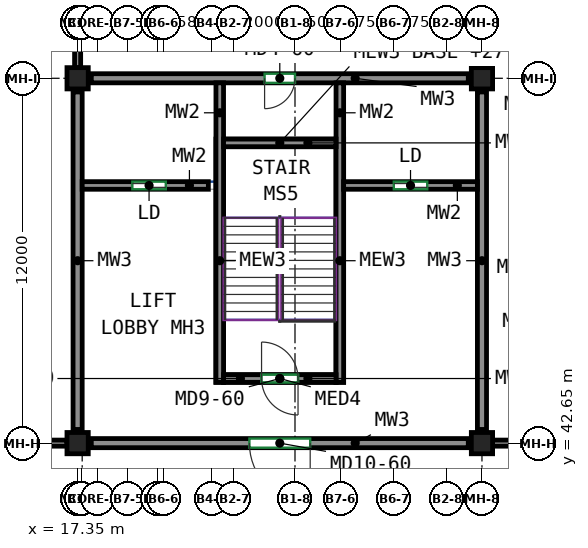
"""IFC4 building model, lengths in metres.
Left out: names, types, materials, properties, quantities, classifications, styles, units other than length and angle.
Written with IfcOpenShell. Run it as: python <this file> out.ifc"""

import sys

from ifc_helpers import new_model, si_unit, direction, frame, frame_2d, origin, origin_2d, place, context, subcontext, project, spatial, rectangle, extrude, source, transform, mapped, element, fill, save


model = new_model("IFC4")
c1 = context("Model", 3, precision=1e-05, world=origin(), true_north=direction((0.0, 1.0)))
c2 = subcontext(c1, "Body", "Model", "MODEL_VIEW")
j1 = project(units=[si_unit("LENGTHUNIT", "METRE"), si_unit("PLANEANGLEUNIT", "RADIAN")], contexts=[c1])
p1 = place(None, origin())
s1 = spatial("IfcSite", under=j1, at=p1, CompositionType="ELEMENT")
p2 = place(p1, origin())
s2 = spatial("IfcBuilding", under=s1, at=p2, CompositionType="ELEMENT")
p3 = place(p2, frame((0.0, 0.0, 22.5)))
s3 = spatial("IfcBuildingStorey", under=s2, at=p3, CompositionType="ELEMENT", Elevation=22.5)
m1 = source(origin(), c2, "Body", "SweptSolid", [
    extrude(rectangle(XDim=0.7, YDim=0.7, at=origin_2d()), origin(), (0.0, 0.0, 1.0), 4.22),
])
for number, where, z_axis, x_axis in (
    (1, (17.35, 42.65, 0.0), (0.0, 0.0, 1.0), (1.0, 0.0, 0.0)),
    (2, (17.35, 54.65, 0.0), (0.0, 0.0, 1.0), (1.0, 0.0, 0.0)),
    (3, (30.65, 42.65, 0.0), (0.0, 0.0, 1.0), (1.0, 0.0, 0.0)),
    (4, (30.65, 54.65, 0.0), (0.0, 0.0, 1.0), (1.0, 0.0, 0.0)),
):
    element("IfcColumn", number, at=place(p3, frame(where, z_axis=z_axis, x_axis=x_axis)), inside=s3, PredefinedType="COLUMN", context=c2, shape_type="MappedRepresentation", body=[
        mapped(m1, transform((0.0, 0.0, 0.0))),
    ])
m2 = source(origin(), c2, "Body", "SweptSolid", [
    extrude(rectangle(XDim=12.4, YDim=0.3, at=frame_2d((6.2, 0.0))), origin(), (0.0, 0.0, 1.0), 3.42),
])
p4 = place(p3, frame((30.2, 54.65, 0.0), z_axis=(0.0, 0.0, 1.0), x_axis=(-1.0, 0.0, 0.0)))
e5 = element("IfcWall", 5, at=p4, inside=s3, PredefinedType="SHEAR", context=c2, shape_type="MappedRepresentation", body=[
    mapped(m2, transform((0.0, 0.0, 0.0))),
])
p5 = place(p4, frame((5.7, 0.0, 0.0)))
e6 = element("IfcOpeningElement", 6, at=p5, cuts=e5, PredefinedType="OPENING", context=c2, shape_type="SweptSolid", body=[
    extrude(rectangle(XDim=1.0, YDim=2.1, at=frame_2d((0.5, 1.05))), frame((0.0, 0.16, 0.0), z_axis=(0.0, -1.0, 0.0), x_axis=(1.0, 0.0, 0.0)), (0.0, 0.0, 1.0), 0.32),
])
p6 = place(p3, frame((30.2, 42.65, 0.0), z_axis=(0.0, 0.0, 1.0), x_axis=(-1.0, 0.0, 0.0)))
e7 = element("IfcWall", 7, at=p6, inside=s3, PredefinedType="SHEAR", context=c2, shape_type="MappedRepresentation", body=[
    mapped(m2, transform((0.0, 0.0, 0.0))),
])
p7 = place(p6, frame((5.2, 0.0, 0.0)))
e8 = element("IfcOpeningElement", 8, at=p7, cuts=e7, PredefinedType="OPENING", context=c2, shape_type="SweptSolid", body=[
    extrude(rectangle(XDim=2.0, YDim=2.4, at=frame_2d((1.0, 1.2))), frame((0.0, 0.16, 0.0), z_axis=(0.0, -1.0, 0.0), x_axis=(1.0, 0.0, 0.0)), (0.0, 0.0, 1.0), 0.32),
])
m3 = source(origin(), c2, "Body", "SweptSolid", [
    extrude(rectangle(XDim=11.1, YDim=0.3, at=frame_2d((5.55, 0.0))), origin(), (0.0, 0.0, 1.0), 3.42),
])
for number, where, z_axis, x_axis in (
    (9, (30.65, 54.2, 0.0), (0.0, 0.0, 1.0), (0.0, -1.0, 0.0)),
    (10, (17.35, 54.2, 0.0), (0.0, 0.0, 1.0), (0.0, -1.0, 0.0)),
):
    element("IfcWall", number, at=place(p3, frame(where, z_axis=z_axis, x_axis=x_axis)), inside=s3, PredefinedType="SHEAR", context=c2, shape_type="MappedRepresentation", body=[
        mapped(m3, transform((0.0, 0.0, 0.0))),
    ])
m4 = source(origin(), c2, "Body", "SweptSolid", [
    extrude(rectangle(XDim=9.85, YDim=0.25, at=frame_2d((4.925, 0.0))), origin(), (0.0, 0.0, 1.0), 4.22),
])
for number, where, z_axis, x_axis in (
    (11, (25.975, 54.5, 0.0), (0.0, 0.0, 1.0), (0.0, -1.0, 0.0)),
    (12, (22.025, 54.5, 0.0), (0.0, 0.0, 1.0), (0.0, -1.0, 0.0)),
):
    element("IfcWall", number, at=place(p3, frame(where, z_axis=z_axis, x_axis=x_axis)), inside=s3, PredefinedType="SHEAR", context=c2, shape_type="MappedRepresentation", body=[
        mapped(m4, transform((0.0, 0.0, 0.0))),
    ])
m5 = source(origin(), c2, "Body", "SweptSolid", [
    extrude(rectangle(XDim=3.7, YDim=0.25, at=frame_2d((1.85, 0.0))), origin(), (0.0, 0.0, 1.0), 4.22),
])
p8 = place(p3, frame((25.85, 52.525, 0.0), z_axis=(0.0, 0.0, 1.0), x_axis=(-1.0, 0.0, 0.0)))
e13 = element("IfcWall", 13, at=p8, inside=s3, PredefinedType="SHEAR", context=c2, shape_type="MappedRepresentation", body=[
    mapped(m5, transform((0.0, 0.0, 0.0))),
])
p9 = place(p3, frame((25.85, 44.775, 0.0), z_axis=(0.0, 0.0, 1.0), x_axis=(-1.0, 0.0, 0.0)))
e14 = element("IfcWall", 14, at=p9, inside=s3, PredefinedType="SHEAR", context=c2, shape_type="MappedRepresentation", body=[
    mapped(m5, transform((0.0, 0.0, 0.0))),
])
p10 = place(p9, frame((1.25, 0.0, 0.0)))
e15 = element("IfcOpeningElement", 15, at=p10, cuts=e14, PredefinedType="OPENING", context=c2, shape_type="SweptSolid", body=[
    extrude(rectangle(XDim=1.2, YDim=2.1, at=frame_2d((0.6, 1.05))), frame((0.0, 0.135, 0.0), z_axis=(0.0, -1.0, 0.0), x_axis=(1.0, 0.0, 0.0)), (0.0, 0.0, 1.0), 0.27),
])
m6 = source(origin(), c2, "Body", "SweptSolid", [
    extrude(rectangle(XDim=4.4, YDim=0.25, at=frame_2d((2.2, 0.0))), origin(), (0.0, 0.0, 1.0), 4.22),
])
p11 = place(p3, frame((30.5, 51.125, 0.0), z_axis=(0.0, 0.0, 1.0), x_axis=(-1.0, 0.0, 0.0)))
e16 = element("IfcWall", 16, at=p11, inside=s3, PredefinedType="SHEAR", context=c2, shape_type="MappedRepresentation", body=[
    mapped(m6, transform((0.0, 0.0, 0.0))),
])
p12 = place(p11, frame((1.65, 0.0, 0.0)))
e17 = element("IfcOpeningElement", 17, at=p12, cuts=e16, PredefinedType="OPENING", context=c2, shape_type="SweptSolid", body=[
    extrude(rectangle(XDim=1.1, YDim=2.1, at=frame_2d((0.55, 1.05))), frame((0.0, 0.135, 0.0), z_axis=(0.0, -1.0, 0.0), x_axis=(1.0, 0.0, 0.0)), (0.0, 0.0, 1.0), 0.27),
])
m7 = source(origin(), c2, "Body", "SweptSolid", [
    extrude(rectangle(XDim=4.15, YDim=0.25, at=frame_2d((2.075, 0.0))), origin(), (0.0, 0.0, 1.0), 4.22),
])
p13 = place(p3, frame((21.65, 51.125, 0.0), z_axis=(0.0, 0.0, 1.0), x_axis=(-1.0, 0.0, 0.0)))
e18 = element("IfcWall", 18, at=p13, inside=s3, PredefinedType="SHEAR", context=c2, shape_type="MappedRepresentation", body=[
    mapped(m7, transform((0.0, 0.0, 0.0))),
])
p14 = place(p13, frame((1.4, 0.0, 0.0)))
e19 = element("IfcOpeningElement", 19, at=p14, cuts=e18, PredefinedType="OPENING", context=c2, shape_type="SweptSolid", body=[
    extrude(rectangle(XDim=1.1, YDim=2.1, at=frame_2d((0.55, 1.05))), frame((0.0, 0.135, 0.0), z_axis=(0.0, -1.0, 0.0), x_axis=(1.0, 0.0, 0.0)), (0.0, 0.0, 1.0), 0.27),
])
m8 = source(origin(), c2, "Body", "SweptSolid", [
    extrude(rectangle(XDim=8.0, YDim=0.25, at=frame_2d((4.0, 0.0))), origin(), (0.0, 0.0, 1.0), 3.0),
])
for number, where, z_axis, x_axis in (
    (20, (22.025, 44.65, 4.5), (0.0, 0.0, 1.0), (0.0, 1.0, 0.0)),
    (21, (25.975, 44.65, 4.5), (0.0, 0.0, 1.0), (0.0, 1.0, 0.0)),
):
    element("IfcWall", number, at=place(p3, frame(where, z_axis=z_axis, x_axis=x_axis)), inside=s3, PredefinedType="SOLIDWALL", context=c2, shape_type="MappedRepresentation", body=[
        mapped(m8, transform((0.0, 0.0, 0.0))),
    ])
m9 = source(origin(), c2, "Body", "SweptSolid", [
    extrude(rectangle(XDim=3.7, YDim=0.25, at=frame_2d((1.85, 0.0))), origin(), (0.0, 0.0, 1.0), 3.0),
])
p15 = place(p3, frame((22.15, 44.775, 4.5), z_axis=(0.0, 0.0, 1.0), x_axis=(1.0, 0.0, 0.0)))
e22 = element("IfcWall", 22, at=p15, inside=s3, PredefinedType="SOLIDWALL", context=c2, shape_type="MappedRepresentation", body=[
    mapped(m9, transform((0.0, 0.0, 0.0))),
])
p16 = place(p15, frame((1.25, 0.0, 0.0)))
e23 = element("IfcOpeningElement", 23, at=p16, cuts=e22, PredefinedType="OPENING", context=c2, shape_type="SweptSolid", body=[
    extrude(rectangle(XDim=1.2, YDim=2.1, at=frame_2d((0.6, 1.05))), frame((0.0, 0.135, 0.0), z_axis=(0.0, -1.0, 0.0), x_axis=(1.0, 0.0, 0.0)), (0.0, 0.0, 1.0), 0.27),
])
p17 = place(p3, frame((22.15, 52.525, 4.5), z_axis=(0.0, 0.0, 1.0), x_axis=(1.0, 0.0, 0.0)))
e24 = element("IfcWall", 24, at=p17, inside=s3, PredefinedType="SOLIDWALL", context=c2, shape_type="MappedRepresentation", body=[
    mapped(m9, transform((0.0, 0.0, 0.0))),
])
m10 = source(origin(), c2, "Body", "SweptSolid", [
    extrude(rectangle(XDim=11.3, YDim=0.2, at=frame_2d((5.65, 0.0))), origin(), (0.0, 0.0, 1.0), 3.42),
])
p18 = place(p3, frame((5.7, 42.65, 0.0), z_axis=(0.0, 0.0, 1.0), x_axis=(1.0, 0.0, 0.0)))
e25 = element("IfcWall", 25, at=p18, inside=s3, PredefinedType="PARTITIONING", context=c2, shape_type="MappedRepresentation", body=[
    mapped(m10, transform((0.0, 0.0, 0.0))),
])
m11 = source(origin(), c2, "Body", "SweptSolid", [
    extrude(rectangle(XDim=1.85, YDim=0.2, at=frame_2d((0.925, 0.0))), origin(), (0.0, 0.0, 1.0), 4.22),
])
p19 = place(p3, frame((17.35, 56.85, 0.0), z_axis=(0.0, 0.0, 1.0), x_axis=(0.0, -1.0, 0.0)))
e26 = element("IfcWall", 26, at=p19, inside=s3, PredefinedType="PARTITIONING", context=c2, shape_type="MappedRepresentation", body=[
    mapped(m11, transform((0.0, 0.0, 0.0))),
])
p20 = place(p3, frame((31.0, 42.65, 0.0), z_axis=(0.0, 0.0, 1.0), x_axis=(1.0, 0.0, 0.0)))
e27 = element("IfcWall", 27, at=p20, inside=s3, PredefinedType="PARTITIONING", context=c2, shape_type="MappedRepresentation", body=[
    mapped(m10, transform((0.0, 0.0, 0.0))),
])
p21 = place(p20, frame((5.15, 0.0, 0.0)))
e28 = element("IfcOpeningElement", 28, at=p21, cuts=e27, PredefinedType="OPENING", context=c2, shape_type="SweptSolid", body=[
    extrude(rectangle(XDim=1.0, YDim=2.1, at=frame_2d((0.5, 1.05))), frame((0.0, 0.11, 0.0), z_axis=(0.0, -1.0, 0.0), x_axis=(1.0, 0.0, 0.0)), (0.0, 0.0, 1.0), 0.22),
])
p22 = place(p16, origin())
e29 = element("IfcDoor", 29, at=p22, inside=s3, OperationType="DOUBLE_DOOR_SINGLE_SWING", PredefinedType="DOOR", context=c2, shape_type="SweptSolid", body=[
    extrude(rectangle(XDim=1.2, YDim=2.1, at=frame_2d((0.6, 1.05))), frame((0.0, 0.025, 0.0), z_axis=(0.0, -1.0, 0.0), x_axis=(1.0, 0.0, 0.0)), (0.0, 0.0, 1.0), 0.05),
])
fill(e23, e29)
p23 = place(p10, origin())
e30 = element("IfcDoor", 30, at=p23, inside=s3, OperationType="DOUBLE_DOOR_SINGLE_SWING", PredefinedType="DOOR", context=c2, shape_type="SweptSolid", body=[
    extrude(rectangle(XDim=1.2, YDim=2.1, at=frame_2d((0.6, 1.05))), frame((0.0, 0.025, 0.0), z_axis=(0.0, -1.0, 0.0), x_axis=(1.0, 0.0, 0.0)), (0.0, 0.0, 1.0), 0.05),
])
fill(e15, e30)
p24 = place(p7, origin())
e31 = element("IfcDoor", 31, at=p24, inside=s3, OperationType="DOUBLE_DOOR_SINGLE_SWING", PredefinedType="DOOR", context=c2, shape_type="SweptSolid", body=[
    extrude(rectangle(XDim=2.0, YDim=2.4, at=frame_2d((1.0, 1.2))), frame((0.0, 0.025, 0.0), z_axis=(0.0, -1.0, 0.0), x_axis=(1.0, 0.0, 0.0)), (0.0, 0.0, 1.0), 0.05),
])
fill(e8, e31)
p25 = place(p12, origin())
e32 = element("IfcDoor", 32, at=p25, inside=s3, OperationType="SLIDING_TO_LEFT", PredefinedType="DOOR", context=c2, shape_type="SweptSolid", body=[
    extrude(rectangle(XDim=1.1, YDim=2.1, at=frame_2d((0.55, 1.05))), frame((0.0, 0.025, 0.0), z_axis=(0.0, -1.0, 0.0), x_axis=(1.0, 0.0, 0.0)), (0.0, 0.0, 1.0), 0.05),
])
fill(e17, e32)
p26 = place(p14, origin())
e33 = element("IfcDoor", 33, at=p26, inside=s3, OperationType="SLIDING_TO_LEFT", PredefinedType="DOOR", context=c2, shape_type="SweptSolid", body=[
    extrude(rectangle(XDim=1.1, YDim=2.1, at=frame_2d((0.55, 1.05))), frame((0.0, 0.025, 0.0), z_axis=(0.0, -1.0, 0.0), x_axis=(1.0, 0.0, 0.0)), (0.0, 0.0, 1.0), 0.05),
])
fill(e19, e33)
p27 = place(p5, origin())
e34 = element("IfcDoor", 34, at=p27, inside=s3, OperationType="SINGLE_SWING_RIGHT", PredefinedType="DOOR", context=c2, shape_type="SweptSolid", body=[
    extrude(rectangle(XDim=1.0, YDim=2.1, at=frame_2d((0.5, 1.05))), frame((0.0, 0.025, 0.0), z_axis=(0.0, -1.0, 0.0), x_axis=(1.0, 0.0, 0.0)), (0.0, 0.0, 1.0), 0.05),
])
fill(e6, e34)
save(model, sys.argv[1])
